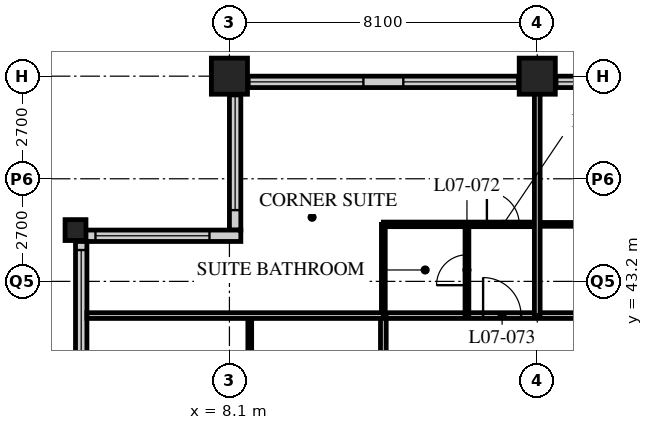
"""IFC4 building model, lengths in metres.
Left out: names, types, materials, properties, quantities, classifications, styles, units other than length and angle.
Written with IfcOpenShell. Run it as: python <this file> out.ifc"""

import sys

from ifc_helpers import new_model, si_unit, direction, frame, frame_2d, origin, origin_2d, place, context, subcontext, project, spatial, rectangle, hollow_rectangle, extrude, element, fill, save


model = new_model("IFC4")
c1 = context("Model", 3, precision=1e-05, world=origin(), true_north=direction((0.0, 1.0)))
c2 = subcontext(c1, "Body", "Model", "MODEL_VIEW")
j1 = project(units=[si_unit("LENGTHUNIT", "METRE"), si_unit("PLANEANGLEUNIT", "RADIAN")], contexts=[c1])
p1 = place(None, origin())
s1 = spatial("IfcSite", under=j1, at=p1, CompositionType="ELEMENT")
p2 = place(p1, origin())
s2 = spatial("IfcBuilding", under=s1, at=p2, CompositionType="ELEMENT")
p3 = place(p2, frame((0.0, 0.0, 36.4)))
s3 = spatial("IfcBuildingStorey", under=s2, at=p3, CompositionType="ELEMENT", Elevation=36.4)
p4 = place(p3, frame((4.05, 44.55, 0.0), z_axis=(0.0, 0.0, 1.0), x_axis=(1.0, 0.0, 0.0)))
e1 = element("IfcColumn", 1, at=p4, inside=s3, PredefinedType="COLUMN", context=c2, shape_type="SweptSolid", body=[
    extrude(hollow_rectangle(XDim=0.55, YDim=0.55, WallThickness=0.05, at=origin_2d()), origin(), (0.0, 0.0, 1.0), 3.4),
])
for number, where, z_axis, x_axis in (
    (2, (8.1, 48.6, 0.0), (0.0, 0.0, 1.0), (1.0, 0.0, 0.0)),
    (3, (16.2, 48.6, 0.0), (0.0, 0.0, 1.0), (1.0, 0.0, 0.0)),
):
    element("IfcColumn", number, at=place(p3, frame(where, z_axis=z_axis, x_axis=x_axis)), inside=s3, PredefinedType="COLUMN", context=c2, shape_type="SweptSolid", body=[
        extrude(hollow_rectangle(XDim=0.95, YDim=0.95, WallThickness=0.095, at=origin_2d()), origin(), (0.0, 0.0, 1.0), 3.4),
    ])
p5 = place(p3, frame((48.3, 48.45, 0.0), z_axis=(0.0, 0.0, 1.0), x_axis=(-1.0, 0.0, 0.0)))
e4 = element("IfcWall", 4, at=p5, inside=s3, PredefinedType="SOLIDWALL", context=c2, shape_type="SweptSolid", body=[
    extrude(rectangle(XDim=40.2, YDim=0.3, at=frame_2d((20.1, 0.0))), origin(), (0.0, 0.0, 1.0), 3.19),
])
p6 = place(p5, frame((0.225, 0.0, 0.9)))
e5 = element("IfcOpeningElement", 5, at=p6, cuts=e4, PredefinedType="OPENING", context=c2, shape_type="SweptSolid", body=[
    extrude(rectangle(XDim=3.0, YDim=2.0, at=frame_2d((1.5, 1.0))), frame((0.0, 0.16, 0.0), z_axis=(0.0, -1.0, 0.0), x_axis=(1.0, 0.0, 0.0)), (0.0, 0.0, 1.0), 0.32),
])
p7 = place(p5, frame((4.275, 0.0, 0.9)))
e6 = element("IfcOpeningElement", 6, at=p7, cuts=e4, PredefinedType="OPENING", context=c2, shape_type="SweptSolid", body=[
    extrude(rectangle(XDim=3.0, YDim=2.0, at=frame_2d((1.5, 1.0))), frame((0.0, 0.16, 0.0), z_axis=(0.0, -1.0, 0.0), x_axis=(1.0, 0.0, 0.0)), (0.0, 0.0, 1.0), 0.32),
])
p8 = place(p5, frame((8.325, 0.0, 0.9)))
e7 = element("IfcOpeningElement", 7, at=p8, cuts=e4, PredefinedType="OPENING", context=c2, shape_type="SweptSolid", body=[
    extrude(rectangle(XDim=3.0, YDim=2.0, at=frame_2d((1.5, 1.0))), frame((0.0, 0.16, 0.0), z_axis=(0.0, -1.0, 0.0), x_axis=(1.0, 0.0, 0.0)), (0.0, 0.0, 1.0), 0.32),
])
p9 = place(p5, frame((12.375, 0.0, 0.9)))
e8 = element("IfcOpeningElement", 8, at=p9, cuts=e4, PredefinedType="OPENING", context=c2, shape_type="SweptSolid", body=[
    extrude(rectangle(XDim=3.0, YDim=2.0, at=frame_2d((1.5, 1.0))), frame((0.0, 0.16, 0.0), z_axis=(0.0, -1.0, 0.0), x_axis=(1.0, 0.0, 0.0)), (0.0, 0.0, 1.0), 0.32),
])
p10 = place(p5, frame((16.425, 0.0, 0.9)))
e9 = element("IfcOpeningElement", 9, at=p10, cuts=e4, PredefinedType="OPENING", context=c2, shape_type="SweptSolid", body=[
    extrude(rectangle(XDim=3.0, YDim=2.0, at=frame_2d((1.5, 1.0))), frame((0.0, 0.16, 0.0), z_axis=(0.0, -1.0, 0.0), x_axis=(1.0, 0.0, 0.0)), (0.0, 0.0, 1.0), 0.32),
])
p11 = place(p5, frame((20.475, 0.0, 0.9)))
e10 = element("IfcOpeningElement", 10, at=p11, cuts=e4, PredefinedType="OPENING", context=c2, shape_type="SweptSolid", body=[
    extrude(rectangle(XDim=3.0, YDim=2.0, at=frame_2d((1.5, 1.0))), frame((0.0, 0.16, 0.0), z_axis=(0.0, -1.0, 0.0), x_axis=(1.0, 0.0, 0.0)), (0.0, 0.0, 1.0), 0.32),
])
p12 = place(p5, frame((24.525, 0.0, 0.9)))
e11 = element("IfcOpeningElement", 11, at=p12, cuts=e4, PredefinedType="OPENING", context=c2, shape_type="SweptSolid", body=[
    extrude(rectangle(XDim=3.0, YDim=2.0, at=frame_2d((1.5, 1.0))), frame((0.0, 0.16, 0.0), z_axis=(0.0, -1.0, 0.0), x_axis=(1.0, 0.0, 0.0)), (0.0, 0.0, 1.0), 0.32),
])
p13 = place(p5, frame((28.575, 0.0, 0.9)))
e12 = element("IfcOpeningElement", 12, at=p13, cuts=e4, PredefinedType="OPENING", context=c2, shape_type="SweptSolid", body=[
    extrude(rectangle(XDim=3.0, YDim=2.0, at=frame_2d((1.5, 1.0))), frame((0.0, 0.16, 0.0), z_axis=(0.0, -1.0, 0.0), x_axis=(1.0, 0.0, 0.0)), (0.0, 0.0, 1.0), 0.32),
])
p14 = place(p5, frame((32.625, 0.0, 0.9)))
e13 = element("IfcOpeningElement", 13, at=p14, cuts=e4, PredefinedType="OPENING", context=c2, shape_type="SweptSolid", body=[
    extrude(rectangle(XDim=3.0, YDim=2.0, at=frame_2d((1.5, 1.0))), frame((0.0, 0.16, 0.0), z_axis=(0.0, -1.0, 0.0), x_axis=(1.0, 0.0, 0.0)), (0.0, 0.0, 1.0), 0.32),
])
p15 = place(p5, frame((36.675, 0.0, 0.9)))
e14 = element("IfcOpeningElement", 14, at=p15, cuts=e4, PredefinedType="OPENING", context=c2, shape_type="SweptSolid", body=[
    extrude(rectangle(XDim=3.0, YDim=2.0, at=frame_2d((1.5, 1.0))), frame((0.0, 0.16, 0.0), z_axis=(0.0, -1.0, 0.0), x_axis=(1.0, 0.0, 0.0)), (0.0, 0.0, 1.0), 0.32),
])
p16 = place(p3, frame((8.25, 48.3, 0.0), z_axis=(0.0, 0.0, 1.0), x_axis=(0.0, -1.0, 0.0)))
e15 = element("IfcWall", 15, at=p16, inside=s3, PredefinedType="SOLIDWALL", context=c2, shape_type="SweptSolid", body=[
    extrude(rectangle(XDim=3.75, YDim=0.3, at=frame_2d((1.875, 0.0))), origin(), (0.0, 0.0, 1.0), 3.19),
])
p17 = place(p16, frame((0.225, 0.0, 0.9)))
e16 = element("IfcOpeningElement", 16, at=p17, cuts=e15, PredefinedType="OPENING", context=c2, shape_type="SweptSolid", body=[
    extrude(rectangle(XDim=3.0, YDim=1.5, at=frame_2d((1.5, 0.75))), frame((0.0, 0.16, 0.0), z_axis=(0.0, -1.0, 0.0), x_axis=(1.0, 0.0, 0.0)), (0.0, 0.0, 1.0), 0.32),
])
p18 = place(p3, frame((8.4, 44.4, 0.0), z_axis=(0.0, 0.0, 1.0), x_axis=(-1.0, 0.0, 0.0)))
e17 = element("IfcWall", 17, at=p18, inside=s3, PredefinedType="SOLIDWALL", context=c2, shape_type="SweptSolid", body=[
    extrude(rectangle(XDim=4.35, YDim=0.3, at=frame_2d((2.175, 0.0))), origin(), (0.0, 0.0, 1.0), 3.19),
])
p19 = place(p18, frame((0.825, 0.0, 0.9)))
e18 = element("IfcOpeningElement", 18, at=p19, cuts=e17, PredefinedType="OPENING", context=c2, shape_type="SweptSolid", body=[
    extrude(rectangle(XDim=3.0, YDim=1.5, at=frame_2d((1.5, 0.75))), frame((0.0, 0.16, 0.0), z_axis=(0.0, -1.0, 0.0), x_axis=(1.0, 0.0, 0.0)), (0.0, 0.0, 1.0), 0.32),
])
p20 = place(p3, frame((4.2, 44.25, 0.0), z_axis=(0.0, 0.0, 1.0), x_axis=(0.0, -1.0, 0.0)))
e19 = element("IfcWall", 19, at=p20, inside=s3, PredefinedType="SOLIDWALL", context=c2, shape_type="SweptSolid", body=[
    extrude(rectangle(XDim=3.75, YDim=0.3, at=frame_2d((1.875, 0.0))), origin(), (0.0, 0.0, 1.0), 3.19),
])
p21 = place(p20, frame((0.225, 0.0, 0.9)))
e20 = element("IfcOpeningElement", 20, at=p21, cuts=e19, PredefinedType="OPENING", context=c2, shape_type="SweptSolid", body=[
    extrude(rectangle(XDim=3.0, YDim=1.5, at=frame_2d((1.5, 0.75))), frame((0.0, 0.16, 0.0), z_axis=(0.0, -1.0, 0.0), x_axis=(1.0, 0.0, 0.0)), (0.0, 0.0, 1.0), 0.32),
])
p22 = place(p3, frame((12.15, 42.3, 0.0), z_axis=(0.0, 0.0, 1.0), x_axis=(1.0, 0.0, 0.0)))
e21 = element("IfcWall", 21, at=p22, inside=s3, PredefinedType="PARTITIONING", context=c2, shape_type="SweptSolid", body=[
    extrude(rectangle(XDim=32.4, YDim=0.15, at=frame_2d((16.2, 0.0))), origin(), (0.0, 0.0, 1.0), 3.19),
])
p23 = place(p22, frame((6.5, 0.0, 0.0)))
e22 = element("IfcOpeningElement", 22, at=p23, cuts=e21, PredefinedType="OPENING", context=c2, shape_type="SweptSolid", body=[
    extrude(rectangle(XDim=1.0, YDim=2.1, at=frame_2d((0.5, 1.05))), frame((0.0, 0.085, 0.0), z_axis=(0.0, -1.0, 0.0), x_axis=(1.0, 0.0, 0.0)), (0.0, 0.0, 1.0), 0.17),
])
p24 = place(p22, frame((8.4, 0.0, 0.0)))
e23 = element("IfcOpeningElement", 23, at=p24, cuts=e21, PredefinedType="OPENING", context=c2, shape_type="SweptSolid", body=[
    extrude(rectangle(XDim=1.0, YDim=2.1, at=frame_2d((0.5, 1.05))), frame((0.0, 0.085, 0.0), z_axis=(0.0, -1.0, 0.0), x_axis=(1.0, 0.0, 0.0)), (0.0, 0.0, 1.0), 0.17),
])
p25 = place(p22, frame((14.6, 0.0, 0.0)))
e24 = element("IfcOpeningElement", 24, at=p25, cuts=e21, PredefinedType="OPENING", context=c2, shape_type="SweptSolid", body=[
    extrude(rectangle(XDim=1.0, YDim=2.1, at=frame_2d((0.5, 1.05))), frame((0.0, 0.085, 0.0), z_axis=(0.0, -1.0, 0.0), x_axis=(1.0, 0.0, 0.0)), (0.0, 0.0, 1.0), 0.17),
])
p26 = place(p22, frame((18.65, 0.0, 0.0)))
e25 = element("IfcOpeningElement", 25, at=p26, cuts=e21, PredefinedType="OPENING", context=c2, shape_type="SweptSolid", body=[
    extrude(rectangle(XDim=1.0, YDim=2.1, at=frame_2d((0.5, 1.05))), frame((0.0, 0.085, 0.0), z_axis=(0.0, -1.0, 0.0), x_axis=(1.0, 0.0, 0.0)), (0.0, 0.0, 1.0), 0.17),
])
p27 = place(p22, frame((23.0, 0.0, 0.0)))
e26 = element("IfcOpeningElement", 26, at=p27, cuts=e21, PredefinedType="OPENING", context=c2, shape_type="SweptSolid", body=[
    extrude(rectangle(XDim=1.0, YDim=2.1, at=frame_2d((0.5, 1.05))), frame((0.0, 0.085, 0.0), z_axis=(0.0, -1.0, 0.0), x_axis=(1.0, 0.0, 0.0)), (0.0, 0.0, 1.0), 0.17),
])
p28 = place(p22, frame((26.75, 0.0, 0.0)))
e27 = element("IfcOpeningElement", 27, at=p28, cuts=e21, PredefinedType="OPENING", context=c2, shape_type="SweptSolid", body=[
    extrude(rectangle(XDim=1.0, YDim=2.1, at=frame_2d((0.5, 1.05))), frame((0.0, 0.085, 0.0), z_axis=(0.0, -1.0, 0.0), x_axis=(1.0, 0.0, 0.0)), (0.0, 0.0, 1.0), 0.17),
])
p29 = place(p22, frame((28.775, 0.0, 0.0)))
e28 = element("IfcOpeningElement", 28, at=p29, cuts=e21, PredefinedType="OPENING", context=c2, shape_type="SweptSolid", body=[
    extrude(rectangle(XDim=1.0, YDim=2.1, at=frame_2d((0.5, 1.05))), frame((0.0, 0.085, 0.0), z_axis=(0.0, -1.0, 0.0), x_axis=(1.0, 0.0, 0.0)), (0.0, 0.0, 1.0), 0.17),
])
p30 = place(p22, frame((2.625, 0.0, 0.0)))
e29 = element("IfcOpeningElement", 29, at=p30, cuts=e21, PredefinedType="OPENING", context=c2, shape_type="SweptSolid", body=[
    extrude(rectangle(XDim=1.0, YDim=2.1, at=frame_2d((0.5, 1.05))), frame((0.0, 0.085, 0.0), z_axis=(0.0, -1.0, 0.0), x_axis=(1.0, 0.0, 0.0)), (0.0, 0.0, 1.0), 0.17),
])
p31 = place(p3, frame((12.15, 16.2, 0.0), z_axis=(0.0, 0.0, 1.0), x_axis=(0.0, 1.0, 0.0)))
e30 = element("IfcWall", 30, at=p31, inside=s3, PredefinedType="PARTITIONING", context=c2, shape_type="SweptSolid", body=[
    extrude(rectangle(XDim=26.1, YDim=0.15, at=frame_2d((13.05, 0.0))), origin(), (0.0, 0.0, 1.0), 3.19),
])
p32 = place(p31, frame((2.75, 0.0, 0.0)))
e31 = element("IfcOpeningElement", 31, at=p32, cuts=e30, PredefinedType="OPENING", context=c2, shape_type="SweptSolid", body=[
    extrude(rectangle(XDim=1.0, YDim=2.1, at=frame_2d((0.5, 1.05))), frame((0.0, 0.085, 0.0), z_axis=(0.0, -1.0, 0.0), x_axis=(1.0, 0.0, 0.0)), (0.0, 0.0, 1.0), 0.17),
])
p33 = place(p31, frame((4.35, 0.0, 0.0)))
e32 = element("IfcOpeningElement", 32, at=p33, cuts=e30, PredefinedType="OPENING", context=c2, shape_type="SweptSolid", body=[
    extrude(rectangle(XDim=1.0, YDim=2.1, at=frame_2d((0.5, 1.05))), frame((0.0, 0.085, 0.0), z_axis=(0.0, -1.0, 0.0), x_axis=(1.0, 0.0, 0.0)), (0.0, 0.0, 1.0), 0.17),
])
p34 = place(p31, frame((10.55, 0.0, 0.0)))
e33 = element("IfcOpeningElement", 33, at=p34, cuts=e30, PredefinedType="OPENING", context=c2, shape_type="SweptSolid", body=[
    extrude(rectangle(XDim=1.0, YDim=2.1, at=frame_2d((0.5, 1.05))), frame((0.0, 0.085, 0.0), z_axis=(0.0, -1.0, 0.0), x_axis=(1.0, 0.0, 0.0)), (0.0, 0.0, 1.0), 0.17),
])
p35 = place(p31, frame((12.45, 0.0, 0.0)))
e34 = element("IfcOpeningElement", 34, at=p35, cuts=e30, PredefinedType="OPENING", context=c2, shape_type="SweptSolid", body=[
    extrude(rectangle(XDim=1.0, YDim=2.1, at=frame_2d((0.5, 1.05))), frame((0.0, 0.085, 0.0), z_axis=(0.0, -1.0, 0.0), x_axis=(1.0, 0.0, 0.0)), (0.0, 0.0, 1.0), 0.17),
])
p36 = place(p31, frame((18.65, 0.0, 0.0)))
e35 = element("IfcOpeningElement", 35, at=p36, cuts=e30, PredefinedType="OPENING", context=c2, shape_type="SweptSolid", body=[
    extrude(rectangle(XDim=1.0, YDim=2.1, at=frame_2d((0.5, 1.05))), frame((0.0, 0.085, 0.0), z_axis=(0.0, -1.0, 0.0), x_axis=(1.0, 0.0, 0.0)), (0.0, 0.0, 1.0), 0.17),
])
p37 = place(p31, frame((22.65, 0.0, 0.0)))
e36 = element("IfcOpeningElement", 36, at=p37, cuts=e30, PredefinedType="OPENING", context=c2, shape_type="SweptSolid", body=[
    extrude(rectangle(XDim=1.0, YDim=2.1, at=frame_2d((0.5, 1.05))), frame((0.0, 0.085, 0.0), z_axis=(0.0, -1.0, 0.0), x_axis=(1.0, 0.0, 0.0)), (0.0, 0.0, 1.0), 0.17),
])
for number, where, z_axis, x_axis in (
    (37, (16.2, 44.7, 0.0), (0.0, 0.0, 1.0), (1.0, 0.0, 0.0)),
    (38, (8.635, 40.0, 0.0), (0.0, 0.0, 1.0), (0.0, 1.0, 0.0)),
):
    element("IfcWall", number, at=place(p3, frame(where, z_axis=z_axis, x_axis=x_axis)), inside=s3, PredefinedType="PARTITIONING", context=c2, shape_type="SweptSolid", body=[
        extrude(rectangle(XDim=2.3, YDim=0.1, at=frame_2d((1.15, 0.0))), origin(), (0.0, 0.0, 1.0), 3.19),
    ])
p38 = place(p3, frame((12.15, 44.7, 0.0), z_axis=(0.0, 0.0, 1.0), x_axis=(1.0, 0.0, 0.0)))
e39 = element("IfcWall", 39, at=p38, inside=s3, PredefinedType="PARTITIONING", context=c2, shape_type="SweptSolid", body=[
    extrude(rectangle(XDim=4.05, YDim=0.12, at=frame_2d((2.025, 0.0))), origin(), (0.0, 0.0, 1.0), 3.19),
])
p39 = place(p38, frame((2.725, 0.0, 0.0)))
e40 = element("IfcOpeningElement", 40, at=p39, cuts=e39, PredefinedType="OPENING", context=c2, shape_type="SweptSolid", body=[
    extrude(rectangle(XDim=0.85, YDim=2.1, at=frame_2d((0.425, 1.05))), frame((0.0, 0.07, 0.0), z_axis=(0.0, -1.0, 0.0), x_axis=(1.0, 0.0, 0.0)), (0.0, 0.0, 1.0), 0.14),
])
p40 = place(p3, frame((14.35, 42.3, 0.0), z_axis=(0.0, 0.0, 1.0), x_axis=(0.0, 1.0, 0.0)))
e41 = element("IfcWall", 41, at=p40, inside=s3, PredefinedType="PARTITIONING", context=c2, shape_type="SweptSolid", body=[
    extrude(rectangle(XDim=2.4, YDim=0.1, at=frame_2d((1.2, 0.0))), origin(), (0.0, 0.0, 1.0), 3.19),
])
p41 = place(p40, frame((0.8, 0.0, 0.0)))
e42 = element("IfcOpeningElement", 42, at=p41, cuts=e41, PredefinedType="OPENING", context=c2, shape_type="SweptSolid", body=[
    extrude(rectangle(XDim=0.8, YDim=2.1, at=frame_2d((0.4, 1.05))), frame((0.0, 0.06, 0.0), z_axis=(0.0, -1.0, 0.0), x_axis=(1.0, 0.0, 0.0)), (0.0, 0.0, 1.0), 0.12),
])
p42 = place(p3, frame((12.15, 42.3, 0.0), z_axis=(0.0, 0.0, 1.0), x_axis=(0.0, 1.0, 0.0)))
e43 = element("IfcWall", 43, at=p42, inside=s3, PredefinedType="PARTITIONING", context=c2, shape_type="SweptSolid", body=[
    extrude(rectangle(XDim=2.4, YDim=0.1, at=frame_2d((1.2, 0.0))), origin(), (0.0, 0.0, 1.0), 3.19),
])
p43 = place(p3, frame((4.35, 42.3, 0.0), z_axis=(0.0, 0.0, 1.0), x_axis=(1.0, 0.0, 0.0)))
e44 = element("IfcWall", 44, at=p43, inside=s3, PredefinedType="PARTITIONING", context=c2, shape_type="SweptSolid", body=[
    extrude(rectangle(XDim=7.8, YDim=0.15, at=frame_2d((3.9, 0.0))), origin(), (0.0, 0.0, 1.0), 3.19),
])
p44 = place(p3, frame((16.2, 42.3, 0.0), z_axis=(0.0, 0.0, 1.0), x_axis=(0.0, 1.0, 0.0)))
e45 = element("IfcWall", 45, at=p44, inside=s3, PredefinedType="PARTITIONING", context=c2, shape_type="SweptSolid", body=[
    extrude(rectangle(XDim=6.0, YDim=0.15, at=frame_2d((3.0, 0.0))), origin(), (0.0, 0.0, 1.0), 2.578),
])
p45 = place(p13, origin())
e46 = element("IfcWindow", 46, at=p45, inside=s3, PartitioningType="SINGLE_PANEL", PredefinedType="WINDOW", context=c2, shape_type="SweptSolid", body=[
    extrude(rectangle(XDim=3.0, YDim=2.0, at=frame_2d((1.5, 1.0))), frame((0.0, 0.03, 0.0), z_axis=(0.0, -1.0, 0.0), x_axis=(1.0, 0.0, 0.0)), (0.0, 0.0, 1.0), 0.06),
])
fill(e12, e46)
p46 = place(p14, origin())
e47 = element("IfcWindow", 47, at=p46, inside=s3, PartitioningType="SINGLE_PANEL", PredefinedType="WINDOW", context=c2, shape_type="SweptSolid", body=[
    extrude(rectangle(XDim=3.0, YDim=2.0, at=frame_2d((1.5, 1.0))), frame((0.0, 0.03, 0.0), z_axis=(0.0, -1.0, 0.0), x_axis=(1.0, 0.0, 0.0)), (0.0, 0.0, 1.0), 0.06),
])
fill(e13, e47)
p47 = place(p15, origin())
e48 = element("IfcWindow", 48, at=p47, inside=s3, PartitioningType="SINGLE_PANEL", PredefinedType="WINDOW", context=c2, shape_type="SweptSolid", body=[
    extrude(rectangle(XDim=3.0, YDim=2.0, at=frame_2d((1.5, 1.0))), frame((0.0, 0.03, 0.0), z_axis=(0.0, -1.0, 0.0), x_axis=(1.0, 0.0, 0.0)), (0.0, 0.0, 1.0), 0.06),
])
fill(e14, e48)
p48 = place(p17, origin())
e49 = element("IfcWindow", 49, at=p48, inside=s3, PartitioningType="SINGLE_PANEL", PredefinedType="WINDOW", context=c2, shape_type="SweptSolid", body=[
    extrude(rectangle(XDim=3.0, YDim=1.5, at=frame_2d((1.5, 0.75))), frame((0.0, 0.03, 0.0), z_axis=(0.0, -1.0, 0.0), x_axis=(1.0, 0.0, 0.0)), (0.0, 0.0, 1.0), 0.06),
])
fill(e16, e49)
p49 = place(p19, origin())
e50 = element("IfcWindow", 50, at=p49, inside=s3, PartitioningType="SINGLE_PANEL", PredefinedType="WINDOW", context=c2, shape_type="SweptSolid", body=[
    extrude(rectangle(XDim=3.0, YDim=1.5, at=frame_2d((1.5, 0.75))), frame((0.0, 0.03, 0.0), z_axis=(0.0, -1.0, 0.0), x_axis=(1.0, 0.0, 0.0)), (0.0, 0.0, 1.0), 0.06),
])
fill(e18, e50)
p50 = place(p21, origin())
e51 = element("IfcWindow", 51, at=p50, inside=s3, PartitioningType="SINGLE_PANEL", PredefinedType="WINDOW", context=c2, shape_type="SweptSolid", body=[
    extrude(rectangle(XDim=3.0, YDim=1.5, at=frame_2d((1.5, 0.75))), frame((0.0, 0.03, 0.0), z_axis=(0.0, -1.0, 0.0), x_axis=(1.0, 0.0, 0.0)), (0.0, 0.0, 1.0), 0.06),
])
fill(e20, e51)
p51 = place(p41, origin())
e52 = element("IfcDoor", 52, at=p51, inside=s3, OperationType="SINGLE_SWING_LEFT", PredefinedType="DOOR", context=c2, shape_type="SweptSolid", body=[
    extrude(rectangle(XDim=0.8, YDim=2.1, at=frame_2d((0.4, 1.05))), frame((0.0, 0.025, 0.0), z_axis=(0.0, -1.0, 0.0), x_axis=(1.0, 0.0, 0.0)), (0.0, 0.0, 1.0), 0.05),
])
fill(e42, e52)
p52 = place(p30, origin())
e53 = element("IfcDoor", 53, at=p52, inside=s3, OperationType="SINGLE_SWING_LEFT", PredefinedType="DOOR", context=c2, shape_type="SweptSolid", body=[
    extrude(rectangle(XDim=1.0, YDim=2.1, at=frame_2d((0.5, 1.05))), frame((0.0, 0.025, 0.0), z_axis=(0.0, -1.0, 0.0), x_axis=(1.0, 0.0, 0.0)), (0.0, 0.0, 1.0), 0.05),
])
fill(e29, e53)
p53 = place(p39, origin())
e54 = element("IfcDoor", 54, at=p53, inside=s3, OperationType="SINGLE_SWING_LEFT", PredefinedType="DOOR", context=c2, shape_type="SweptSolid", body=[
    extrude(rectangle(XDim=0.85, YDim=2.1, at=frame_2d((0.425, 1.05))), frame((0.0, 0.025, 0.0), z_axis=(0.0, -1.0, 0.0), x_axis=(1.0, 0.0, 0.0)), (0.0, 0.0, 1.0), 0.05),
])
fill(e40, e54)
save(model, sys.argv[1])
